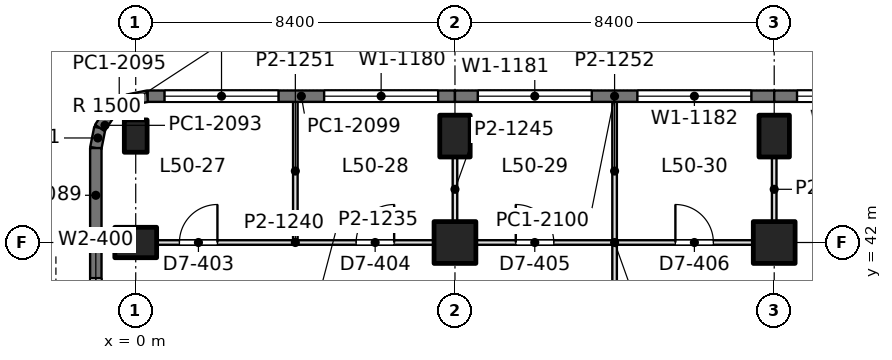
"""IFC4 building model, lengths in metres.
Left out: names, types, materials, properties, quantities, classifications, styles, units other than length and angle.
Written with IfcOpenShell. Run it as: python <this file> out.ifc"""

import sys

from ifc_helpers import new_model, si_unit, direction, frame, frame_2d, origin, origin_2d, place, context, subcontext, project, spatial, rectangle, extrude, element, fill, save


model = new_model("IFC4")
c1 = context("Model", 3, precision=1e-05, world=origin(), true_north=direction((0.0, 1.0)))
c2 = subcontext(c1, "Body", "Model", "MODEL_VIEW")
j1 = project(units=[si_unit("LENGTHUNIT", "METRE"), si_unit("PLANEANGLEUNIT", "RADIAN")], contexts=[c1])
p1 = place(None, origin())
s1 = spatial("IfcSite", under=j1, at=p1, CompositionType="ELEMENT")
p2 = place(p1, origin())
s2 = spatial("IfcBuilding", under=s1, at=p2, CompositionType="ELEMENT")
p3 = place(p2, frame((0.0, 0.0, 219.6)))
s3 = spatial("IfcBuildingStorey", under=s2, at=p3, CompositionType="ELEMENT", Elevation=219.6)
p4 = place(p3, frame((0.0, 42.0, 0.0), z_axis=(0.0, 0.0, 1.0), x_axis=(0.0, 1.0, 0.0)))
e1 = element("IfcColumn", 1, at=p4, inside=s3, PredefinedType="COLUMN", context=c2, shape_type="SweptSolid", body=[
    extrude(rectangle(XDim=0.8, YDim=1.1, at=origin_2d()), origin(), (0.0, 0.0, 1.0), 4.2),
])
p5 = place(p3, frame((0.0, 44.8, 0.0), z_axis=(0.0, 0.0, 1.0), x_axis=(1.0, 0.0, 0.0)))
e2 = element("IfcColumn", 2, at=p5, inside=s3, PredefinedType="COLUMN", context=c2, shape_type="SweptSolid", body=[
    extrude(rectangle(XDim=0.6, YDim=0.85, at=origin_2d()), origin(), (0.0, 0.0, 1.0), 4.2),
])
p6 = place(p3, frame((8.4, 42.0, 0.0), z_axis=(0.0, 0.0, 1.0), x_axis=(1.0, 0.0, 0.0)))
e3 = element("IfcColumn", 3, at=p6, inside=s3, PredefinedType="COLUMN", context=c2, shape_type="SweptSolid", body=[
    extrude(rectangle(XDim=1.1, YDim=1.1, at=origin_2d()), origin(), (0.0, 0.0, 1.0), 4.2),
])
p7 = place(p3, frame((8.4, 44.8, 0.0), z_axis=(0.0, 0.0, 1.0), x_axis=(1.0, 0.0, 0.0)))
e4 = element("IfcColumn", 4, at=p7, inside=s3, PredefinedType="COLUMN", context=c2, shape_type="SweptSolid", body=[
    extrude(rectangle(XDim=0.8, YDim=1.1, at=origin_2d()), origin(), (0.0, 0.0, 1.0), 4.2),
])
p8 = place(p3, frame((16.8, 42.0, 0.0), z_axis=(0.0, 0.0, 1.0), x_axis=(1.0, 0.0, 0.0)))
e5 = element("IfcColumn", 5, at=p8, inside=s3, PredefinedType="COLUMN", context=c2, shape_type="SweptSolid", body=[
    extrude(rectangle(XDim=1.1, YDim=1.1, at=origin_2d()), origin(), (0.0, 0.0, 1.0), 4.2),
])
p9 = place(p3, frame((16.8, 44.8, 0.0), z_axis=(0.0, 0.0, 1.0), x_axis=(1.0, 0.0, 0.0)))
e6 = element("IfcColumn", 6, at=p9, inside=s3, PredefinedType="COLUMN", context=c2, shape_type="SweptSolid", body=[
    extrude(rectangle(XDim=0.8, YDim=1.1, at=origin_2d()), origin(), (0.0, 0.0, 1.0), 4.2),
])
p10 = place(p3, frame((-1.05, 37.725, 0.0), z_axis=(0.0, 0.0, 1.0), x_axis=(0.0, 1.0, 0.0)))
e7 = element("IfcWall", 7, at=p10, inside=s3, PredefinedType="SOLIDWALL", context=c2, shape_type="SweptSolid", body=[
    extrude(rectangle(XDim=4.275, YDim=0.3, at=frame_2d((2.137, 0.0))), origin(), (0.0, 0.0, 1.0), 4.05),
])
p11 = place(p10, frame((0.938, 0.0, 0.9)))
e8 = element("IfcOpeningElement", 8, at=p11, cuts=e7, PredefinedType="OPENING", context=c2, shape_type="SweptSolid", body=[
    extrude(rectangle(XDim=2.4, YDim=1.9, at=frame_2d((1.2, 0.95))), frame((0.0, 0.16, 0.0), z_axis=(0.0, -1.0, 0.0), x_axis=(1.0, 0.0, 0.0)), (0.0, 0.0, 1.0), 0.32),
])
p12 = place(p3, frame((-1.05, 42.0, 0.0), z_axis=(0.0, 0.0, 1.0), x_axis=(0.0, 1.0, 0.0)))
e9 = element("IfcWall", 9, at=p12, inside=s3, PredefinedType="SOLIDWALL", context=c2, shape_type="SweptSolid", body=[
    extrude(rectangle(XDim=2.485, YDim=0.3, at=frame_2d((1.243, 0.0))), origin(), (0.0, 0.0, 1.0), 4.05),
])
p13 = place(p3, frame((-1.05, 44.485, 0.0), z_axis=(0.0, 0.0, 1.0), x_axis=(0.195073962632, 0.980788534345, 0.0)))
e10 = element("IfcWall", 10, at=p13, inside=s3, PredefinedType="SOLIDWALL", context=c2, shape_type="SweptSolid", body=[
    extrude(rectangle(XDim=0.541, YDim=0.3, at=frame_2d((0.271, 0.0))), origin(), (0.0, 0.0, 1.0), 4.05),
])
p14 = place(p3, frame((-0.945, 45.015, 0.0), z_axis=(0.0, 0.0, 1.0), x_axis=(0.55534295404, 0.831621430339, 0.0)))
e11 = element("IfcWall", 11, at=p14, inside=s3, PredefinedType="SOLIDWALL", context=c2, shape_type="SweptSolid", body=[
    extrude(rectangle(XDim=0.526, YDim=0.3, at=frame_2d((0.263, 0.0))), origin(), (0.0, 0.0, 1.0), 4.05),
])
p15 = place(p3, frame((-0.653, 45.453, 0.0), z_axis=(0.0, 0.0, 1.0), x_axis=(0.831692711774, 0.555236195849, 0.0)))
e12 = element("IfcWall", 12, at=p15, inside=s3, PredefinedType="SOLIDWALL", context=c2, shape_type="SweptSolid", body=[
    extrude(rectangle(XDim=0.525, YDim=0.3, at=frame_2d((0.263, 0.0))), origin(), (0.0, 0.0, 1.0), 4.05),
])
p16 = place(p3, frame((-0.216, 45.744, 0.0), z_axis=(0.0, 0.0, 1.0), x_axis=(0.980702050465, 0.1955082817, 0.0)))
e13 = element("IfcWall", 13, at=p16, inside=s3, PredefinedType="SOLIDWALL", context=c2, shape_type="SweptSolid", body=[
    extrude(rectangle(XDim=0.541, YDim=0.3, at=frame_2d((0.271, 0.0))), origin(), (0.0, 0.0, 1.0), 4.05),
])
p17 = place(p3, frame((0.315, 45.85, 0.0), z_axis=(0.0, 0.0, 1.0), x_axis=(1.0, 0.0, 0.0)))
e14 = element("IfcWall", 14, at=p17, inside=s3, PredefinedType="SOLIDWALL", context=c2, shape_type="SweptSolid", body=[
    extrude(rectangle(XDim=8.085, YDim=0.3, at=frame_2d((4.042, 0.0))), origin(), (0.0, 0.0, 1.0), 4.05),
])
p18 = place(p17, frame((0.443, 0.0, 0.9)))
e15 = element("IfcOpeningElement", 15, at=p18, cuts=e14, PredefinedType="OPENING", context=c2, shape_type="SweptSolid", body=[
    extrude(rectangle(XDim=3.0, YDim=1.9, at=frame_2d((1.5, 0.95))), frame((0.0, 0.16, 0.0), z_axis=(0.0, -1.0, 0.0), x_axis=(1.0, 0.0, 0.0)), (0.0, 0.0, 1.0), 0.32),
])
p19 = place(p17, frame((4.643, 0.0, 0.9)))
e16 = element("IfcOpeningElement", 16, at=p19, cuts=e14, PredefinedType="OPENING", context=c2, shape_type="SweptSolid", body=[
    extrude(rectangle(XDim=3.0, YDim=1.9, at=frame_2d((1.5, 0.95))), frame((0.0, 0.16, 0.0), z_axis=(0.0, -1.0, 0.0), x_axis=(1.0, 0.0, 0.0)), (0.0, 0.0, 1.0), 0.32),
])
p20 = place(p3, frame((8.4, 45.85, 0.0), z_axis=(0.0, 0.0, 1.0), x_axis=(1.0, 0.0, 0.0)))
e17 = element("IfcWall", 17, at=p20, inside=s3, PredefinedType="SOLIDWALL", context=c2, shape_type="SweptSolid", body=[
    extrude(rectangle(XDim=8.4, YDim=0.3, at=frame_2d((4.2, 0.0))), origin(), (0.0, 0.0, 1.0), 4.05),
])
p21 = place(p20, frame((0.6, 0.0, 0.9)))
e18 = element("IfcOpeningElement", 18, at=p21, cuts=e17, PredefinedType="OPENING", context=c2, shape_type="SweptSolid", body=[
    extrude(rectangle(XDim=3.0, YDim=1.9, at=frame_2d((1.5, 0.95))), frame((0.0, 0.16, 0.0), z_axis=(0.0, -1.0, 0.0), x_axis=(1.0, 0.0, 0.0)), (0.0, 0.0, 1.0), 0.32),
])
p22 = place(p20, frame((4.8, 0.0, 0.9)))
e19 = element("IfcOpeningElement", 19, at=p22, cuts=e17, PredefinedType="OPENING", context=c2, shape_type="SweptSolid", body=[
    extrude(rectangle(XDim=3.0, YDim=1.9, at=frame_2d((1.5, 0.95))), frame((0.0, 0.16, 0.0), z_axis=(0.0, -1.0, 0.0), x_axis=(1.0, 0.0, 0.0)), (0.0, 0.0, 1.0), 0.32),
])
p23 = place(p3, frame((16.8, 45.85, 0.0), z_axis=(0.0, 0.0, 1.0), x_axis=(1.0, 0.0, 0.0)))
e20 = element("IfcWall", 20, at=p23, inside=s3, PredefinedType="SOLIDWALL", context=c2, shape_type="SweptSolid", body=[
    extrude(rectangle(XDim=8.4, YDim=0.3, at=frame_2d((4.2, 0.0))), origin(), (0.0, 0.0, 1.0), 4.05),
])
p24 = place(p23, frame((0.6, 0.0, 0.9)))
e21 = element("IfcOpeningElement", 21, at=p24, cuts=e20, PredefinedType="OPENING", context=c2, shape_type="SweptSolid", body=[
    extrude(rectangle(XDim=3.0, YDim=1.9, at=frame_2d((1.5, 0.95))), frame((0.0, 0.16, 0.0), z_axis=(0.0, -1.0, 0.0), x_axis=(1.0, 0.0, 0.0)), (0.0, 0.0, 1.0), 0.32),
])
p25 = place(p23, frame((4.8, 0.0, 0.9)))
e22 = element("IfcOpeningElement", 22, at=p25, cuts=e20, PredefinedType="OPENING", context=c2, shape_type="SweptSolid", body=[
    extrude(rectangle(XDim=3.0, YDim=1.9, at=frame_2d((1.5, 0.95))), frame((0.0, 0.16, 0.0), z_axis=(0.0, -1.0, 0.0), x_axis=(1.0, 0.0, 0.0)), (0.0, 0.0, 1.0), 0.32),
])
p26 = place(p3, frame((0.549, 42.0, 0.0), z_axis=(0.0, 0.0, 1.0), x_axis=(1.0, 0.0, 0.0)))
e23 = element("IfcWall", 23, at=p26, inside=s3, PredefinedType="PARTITIONING", context=c2, shape_type="SweptSolid", body=[
    extrude(rectangle(XDim=7.302, YDim=0.12, at=frame_2d((3.651, 0.0))), origin(), (0.0, 0.0, 1.0), 3.55),
])
p27 = place(p26, frame((0.601, 0.0, 0.0)))
e24 = element("IfcOpeningElement", 24, at=p27, cuts=e23, PredefinedType="OPENING", context=c2, shape_type="SweptSolid", body=[
    extrude(rectangle(XDim=1.0, YDim=2.4, at=frame_2d((0.5, 1.2))), frame((0.0, 0.07, 0.0), z_axis=(0.0, -1.0, 0.0), x_axis=(1.0, 0.0, 0.0)), (0.0, 0.0, 1.0), 0.14),
])
p28 = place(p26, frame((5.251, 0.0, 0.0)))
e25 = element("IfcOpeningElement", 25, at=p28, cuts=e23, PredefinedType="OPENING", context=c2, shape_type="SweptSolid", body=[
    extrude(rectangle(XDim=1.0, YDim=2.4, at=frame_2d((0.5, 1.2))), frame((0.0, 0.07, 0.0), z_axis=(0.0, -1.0, 0.0), x_axis=(1.0, 0.0, 0.0)), (0.0, 0.0, 1.0), 0.14),
])
p29 = place(p3, frame((8.949, 42.0, 0.0), z_axis=(0.0, 0.0, 1.0), x_axis=(1.0, 0.0, 0.0)))
e26 = element("IfcWall", 26, at=p29, inside=s3, PredefinedType="PARTITIONING", context=c2, shape_type="SweptSolid", body=[
    extrude(rectangle(XDim=7.302, YDim=0.12, at=frame_2d((3.651, 0.0))), origin(), (0.0, 0.0, 1.0), 3.55),
])
p30 = place(p29, frame((1.051, 0.0, 0.0)))
e27 = element("IfcOpeningElement", 27, at=p30, cuts=e26, PredefinedType="OPENING", context=c2, shape_type="SweptSolid", body=[
    extrude(rectangle(XDim=1.0, YDim=2.4, at=frame_2d((0.5, 1.2))), frame((0.0, 0.07, 0.0), z_axis=(0.0, -1.0, 0.0), x_axis=(1.0, 0.0, 0.0)), (0.0, 0.0, 1.0), 0.14),
])
p31 = place(p29, frame((5.251, 0.0, 0.0)))
e28 = element("IfcOpeningElement", 28, at=p31, cuts=e26, PredefinedType="OPENING", context=c2, shape_type="SweptSolid", body=[
    extrude(rectangle(XDim=1.0, YDim=2.4, at=frame_2d((0.5, 1.2))), frame((0.0, 0.07, 0.0), z_axis=(0.0, -1.0, 0.0), x_axis=(1.0, 0.0, 0.0)), (0.0, 0.0, 1.0), 0.14),
])
p32 = place(p3, frame((4.2, 42.058, 0.0), z_axis=(0.0, 0.0, 1.0), x_axis=(0.0, 1.0, 0.0)))
e29 = element("IfcWall", 29, at=p32, inside=s3, PredefinedType="PARTITIONING", context=c2, shape_type="SweptSolid", body=[
    extrude(rectangle(XDim=3.644, YDim=0.12, at=frame_2d((1.822, 0.0))), origin(), (0.0, 0.0, 1.0), 3.55),
])
p33 = place(p3, frame((8.4, 42.549, 0.0), z_axis=(0.0, 0.0, 1.0), x_axis=(0.0, 1.0, 0.0)))
e30 = element("IfcWall", 30, at=p33, inside=s3, PredefinedType="PARTITIONING", context=c2, shape_type="SweptSolid", body=[
    extrude(rectangle(XDim=1.702, YDim=0.12, at=frame_2d((0.851, 0.0))), origin(), (0.0, 0.0, 1.0), 3.69),
])
p34 = place(p3, frame((12.6, 42.058, 0.0), z_axis=(0.0, 0.0, 1.0), x_axis=(0.0, 1.0, 0.0)))
e31 = element("IfcWall", 31, at=p34, inside=s3, PredefinedType="PARTITIONING", context=c2, shape_type="SweptSolid", body=[
    extrude(rectangle(XDim=3.644, YDim=0.12, at=frame_2d((1.822, 0.0))), origin(), (0.0, 0.0, 1.0), 3.55),
])
p35 = place(p3, frame((16.8, 42.549, 0.0), z_axis=(0.0, 0.0, 1.0), x_axis=(0.0, 1.0, 0.0)))
e32 = element("IfcWall", 32, at=p35, inside=s3, PredefinedType="PARTITIONING", context=c2, shape_type="SweptSolid", body=[
    extrude(rectangle(XDim=1.702, YDim=0.12, at=frame_2d((0.851, 0.0))), origin(), (0.0, 0.0, 1.0), 3.69),
])
p36 = place(p3, frame((12.6, 39.358, 0.0), z_axis=(0.0, 0.0, 1.0), x_axis=(0.0, 1.0, 0.0)))
e33 = element("IfcWall", 33, at=p36, inside=s3, PredefinedType="PARTITIONING", context=c2, shape_type="SweptSolid", body=[
    extrude(rectangle(XDim=2.584, YDim=0.12, at=frame_2d((1.292, 0.0))), origin(), (0.0, 0.0, 1.0), 3.55),
])
p37 = place(p11, origin())
e34 = element("IfcWindow", 34, at=p37, inside=s3, PartitioningType="SINGLE_PANEL", PredefinedType="WINDOW", context=c2, shape_type="SweptSolid", body=[
    extrude(rectangle(XDim=2.4, YDim=1.9, at=frame_2d((1.2, 0.95))), frame((0.0, 0.03, 0.0), z_axis=(0.0, -1.0, 0.0), x_axis=(1.0, 0.0, 0.0)), (0.0, 0.0, 1.0), 0.06),
])
fill(e8, e34)
p38 = place(p18, origin())
e35 = element("IfcWindow", 35, at=p38, inside=s3, PartitioningType="SINGLE_PANEL", PredefinedType="WINDOW", context=c2, shape_type="SweptSolid", body=[
    extrude(rectangle(XDim=3.0, YDim=1.9, at=frame_2d((1.5, 0.95))), frame((0.0, 0.03, 0.0), z_axis=(0.0, -1.0, 0.0), x_axis=(1.0, 0.0, 0.0)), (0.0, 0.0, 1.0), 0.06),
])
fill(e15, e35)
p39 = place(p19, origin())
e36 = element("IfcWindow", 36, at=p39, inside=s3, PartitioningType="SINGLE_PANEL", PredefinedType="WINDOW", context=c2, shape_type="SweptSolid", body=[
    extrude(rectangle(XDim=3.0, YDim=1.9, at=frame_2d((1.5, 0.95))), frame((0.0, 0.03, 0.0), z_axis=(0.0, -1.0, 0.0), x_axis=(1.0, 0.0, 0.0)), (0.0, 0.0, 1.0), 0.06),
])
fill(e16, e36)
p40 = place(p21, origin())
e37 = element("IfcWindow", 37, at=p40, inside=s3, PartitioningType="SINGLE_PANEL", PredefinedType="WINDOW", context=c2, shape_type="SweptSolid", body=[
    extrude(rectangle(XDim=3.0, YDim=1.9, at=frame_2d((1.5, 0.95))), frame((0.0, 0.03, 0.0), z_axis=(0.0, -1.0, 0.0), x_axis=(1.0, 0.0, 0.0)), (0.0, 0.0, 1.0), 0.06),
])
fill(e18, e37)
p41 = place(p22, origin())
e38 = element("IfcWindow", 38, at=p41, inside=s3, PartitioningType="SINGLE_PANEL", PredefinedType="WINDOW", context=c2, shape_type="SweptSolid", body=[
    extrude(rectangle(XDim=3.0, YDim=1.9, at=frame_2d((1.5, 0.95))), frame((0.0, 0.03, 0.0), z_axis=(0.0, -1.0, 0.0), x_axis=(1.0, 0.0, 0.0)), (0.0, 0.0, 1.0), 0.06),
])
fill(e19, e38)
p42 = place(p24, origin())
e39 = element("IfcWindow", 39, at=p42, inside=s3, PartitioningType="SINGLE_PANEL", PredefinedType="WINDOW", context=c2, shape_type="SweptSolid", body=[
    extrude(rectangle(XDim=3.0, YDim=1.9, at=frame_2d((1.5, 0.95))), frame((0.0, 0.03, 0.0), z_axis=(0.0, -1.0, 0.0), x_axis=(1.0, 0.0, 0.0)), (0.0, 0.0, 1.0), 0.06),
])
fill(e21, e39)
p43 = place(p27, origin())
e40 = element("IfcDoor", 40, at=p43, inside=s3, OperationType="SINGLE_SWING_RIGHT", PredefinedType="DOOR", context=c2, shape_type="SweptSolid", body=[
    extrude(rectangle(XDim=1.0, YDim=2.4, at=frame_2d((0.5, 1.2))), frame((0.0, 0.025, 0.0), z_axis=(0.0, -1.0, 0.0), x_axis=(1.0, 0.0, 0.0)), (0.0, 0.0, 1.0), 0.05),
])
fill(e24, e40)
p44 = place(p28, origin())
e41 = element("IfcDoor", 41, at=p44, inside=s3, OperationType="SINGLE_SWING_RIGHT", PredefinedType="DOOR", context=c2, shape_type="SweptSolid", body=[
    extrude(rectangle(XDim=1.0, YDim=2.4, at=frame_2d((0.5, 1.2))), frame((0.0, 0.025, 0.0), z_axis=(0.0, -1.0, 0.0), x_axis=(1.0, 0.0, 0.0)), (0.0, 0.0, 1.0), 0.05),
])
fill(e25, e41)
p45 = place(p30, origin())
e42 = element("IfcDoor", 42, at=p45, inside=s3, OperationType="SINGLE_SWING_LEFT", PredefinedType="DOOR", context=c2, shape_type="SweptSolid", body=[
    extrude(rectangle(XDim=1.0, YDim=2.4, at=frame_2d((0.5, 1.2))), frame((0.0, 0.025, 0.0), z_axis=(0.0, -1.0, 0.0), x_axis=(1.0, 0.0, 0.0)), (0.0, 0.0, 1.0), 0.05),
])
fill(e27, e42)
p46 = place(p31, origin())
e43 = element("IfcDoor", 43, at=p46, inside=s3, OperationType="SINGLE_SWING_LEFT", PredefinedType="DOOR", context=c2, shape_type="SweptSolid", body=[
    extrude(rectangle(XDim=1.0, YDim=2.4, at=frame_2d((0.5, 1.2))), frame((0.0, 0.025, 0.0), z_axis=(0.0, -1.0, 0.0), x_axis=(1.0, 0.0, 0.0)), (0.0, 0.0, 1.0), 0.05),
])
fill(e28, e43)
save(model, sys.argv[1])
